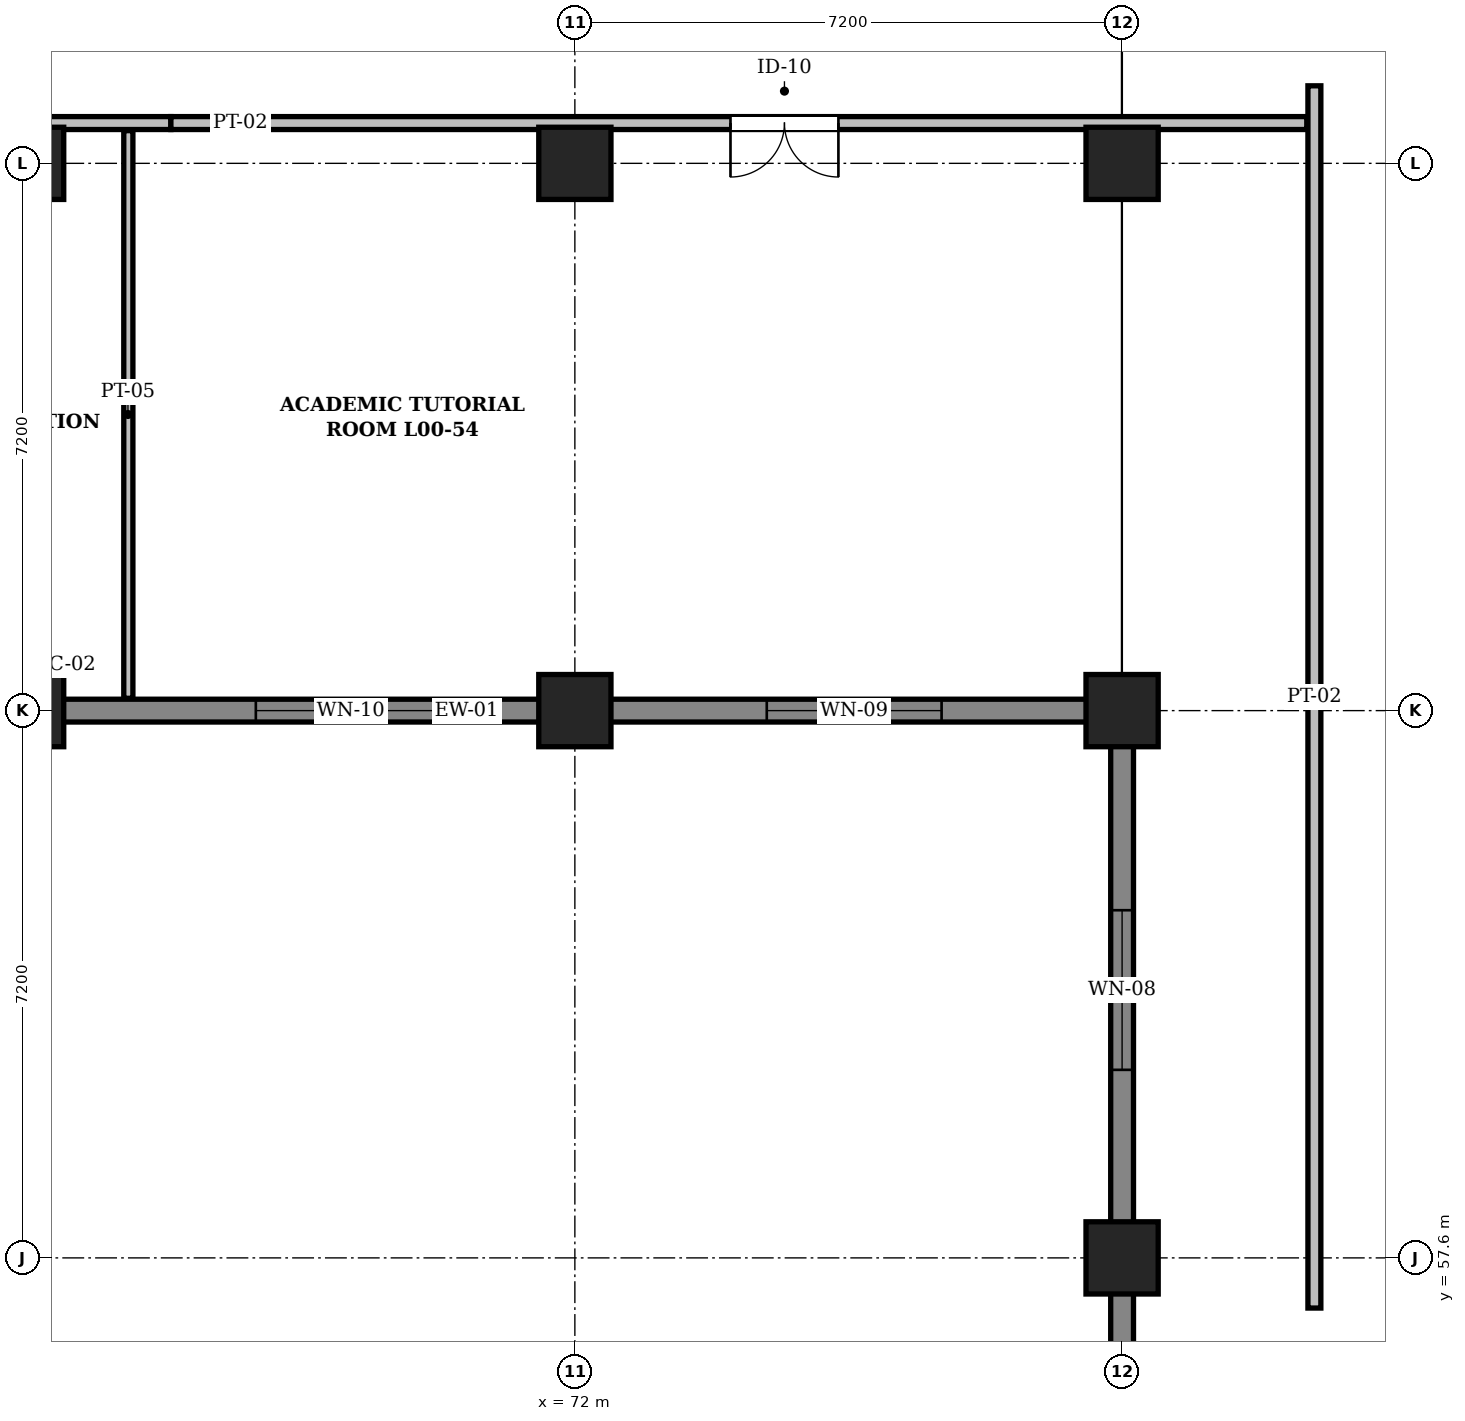
"""IFC4 building model, lengths in metres.
Left out: names, types, materials, properties, quantities, classifications, styles, units other than length and angle.
Written with IfcOpenShell. Run it as: python <this file> out.ifc"""

import sys

from ifc_helpers import new_model, si_unit, direction, frame, frame_2d, origin, origin_2d, place, context, subcontext, project, spatial, rectangle, extrude, element, fill, save


model = new_model("IFC4")
c1 = context("Model", 3, precision=1e-05, world=origin(), true_north=direction((0.0, 1.0)))
c2 = subcontext(c1, "Body", "Model", "MODEL_VIEW")
j1 = project(units=[si_unit("LENGTHUNIT", "METRE"), si_unit("PLANEANGLEUNIT", "RADIAN")], contexts=[c1])
p1 = place(None, origin())
s1 = spatial("IfcSite", under=j1, at=p1, CompositionType="ELEMENT")
p2 = place(p1, origin())
s2 = spatial("IfcBuilding", under=s1, at=p2, CompositionType="ELEMENT")
p3 = place(p2, origin())
s3 = spatial("IfcBuildingStorey", under=s2, at=p3, CompositionType="ELEMENT", Elevation=0.0)
for number, where, z_axis, x_axis in (
    (1, (64.8, 64.8, 0.0), (0.0, 0.0, 1.0), (1.0, 0.0, 0.0)),
    (2, (64.8, 72.0, 0.0), (0.0, 0.0, 1.0), (1.0, 0.0, 0.0)),
    (3, (72.0, 64.8, 0.0), (0.0, 0.0, 1.0), (1.0, 0.0, 0.0)),
    (4, (72.0, 72.0, 0.0), (0.0, 0.0, 1.0), (1.0, 0.0, 0.0)),
    (5, (79.2, 57.6, 0.0), (0.0, 0.0, 1.0), (1.0, 0.0, 0.0)),
    (6, (79.2, 64.8, 0.0), (0.0, 0.0, 1.0), (1.0, 0.0, 0.0)),
    (7, (79.2, 72.0, 0.0), (0.0, 0.0, 1.0), (1.0, 0.0, 0.0)),
):
    element("IfcColumn", number, at=place(p3, frame(where, z_axis=z_axis, x_axis=x_axis)), inside=s3, PredefinedType="COLUMN", context=c2, shape_type="SweptSolid", body=[
        extrude(rectangle(XDim=0.95, YDim=0.95, at=origin_2d()), origin(), (0.0, 0.0, 1.0), 4.8),
    ])
p4 = place(p3, frame((79.2, 50.4, 0.0), z_axis=(0.0, 0.0, 1.0), x_axis=(0.0, 1.0, 0.0)))
e8 = element("IfcWall", 8, at=p4, inside=s3, PredefinedType="SOLIDWALL", context=c2, shape_type="SweptSolid", body=[
    extrude(rectangle(XDim=7.2, YDim=0.3, at=frame_2d((3.6, 0.0))), origin(), (0.0, 0.0, 1.0), 4.52),
])
p5 = place(p4, frame((2.65, 0.0, 0.95)))
e9 = element("IfcOpeningElement", 9, at=p5, cuts=e8, PredefinedType="OPENING", context=c2, shape_type="SweptSolid", body=[
    extrude(rectangle(XDim=1.9, YDim=1.3, at=frame_2d((0.95, 0.65))), frame((0.0, 0.162, 0.0), z_axis=(0.0, -1.0, 0.0), x_axis=(1.0, 0.0, 0.0)), (0.0, 0.0, 1.0), 0.324),
])
p6 = place(p3, frame((79.2, 57.6, 0.0), z_axis=(0.0, 0.0, 1.0), x_axis=(0.0, 1.0, 0.0)))
e10 = element("IfcWall", 10, at=p6, inside=s3, PredefinedType="SOLIDWALL", context=c2, shape_type="SweptSolid", body=[
    extrude(rectangle(XDim=7.048, YDim=0.3, at=frame_2d((3.524, 0.0))), origin(), (0.0, 0.0, 1.0), 4.52),
])
p7 = place(p6, frame((2.474, 0.0, 0.95)))
e11 = element("IfcOpeningElement", 11, at=p7, cuts=e10, PredefinedType="OPENING", context=c2, shape_type="SweptSolid", body=[
    extrude(rectangle(XDim=2.1, YDim=1.3, at=frame_2d((1.05, 0.65))), frame((0.0, 0.162, 0.0), z_axis=(0.0, -1.0, 0.0), x_axis=(1.0, 0.0, 0.0)), (0.0, 0.0, 1.0), 0.324),
])
p8 = place(p3, frame((79.35, 64.8, 0.0), z_axis=(0.0, 0.0, 1.0), x_axis=(-1.0, 0.0, 0.0)))
e12 = element("IfcWall", 12, at=p8, inside=s3, PredefinedType="SOLIDWALL", context=c2, shape_type="SweptSolid", body=[
    extrude(rectangle(XDim=7.35, YDim=0.3, at=frame_2d((3.675, 0.0))), origin(), (0.0, 0.0, 1.0), 4.52),
])
p9 = place(p8, frame((2.525, 0.0, 0.95)))
e13 = element("IfcOpeningElement", 13, at=p9, cuts=e12, PredefinedType="OPENING", context=c2, shape_type="SweptSolid", body=[
    extrude(rectangle(XDim=2.3, YDim=1.3, at=frame_2d((1.15, 0.65))), frame((0.0, 0.162, 0.0), z_axis=(0.0, -1.0, 0.0), x_axis=(1.0, 0.0, 0.0)), (0.0, 0.0, 1.0), 0.324),
])
p10 = place(p3, frame((72.0, 64.8, 0.0), z_axis=(0.0, 0.0, 1.0), x_axis=(-1.0, 0.0, 0.0)))
e14 = element("IfcWall", 14, at=p10, inside=s3, PredefinedType="SOLIDWALL", context=c2, shape_type="SweptSolid", body=[
    extrude(rectangle(XDim=7.2, YDim=0.3, at=frame_2d((3.6, 0.0))), origin(), (0.0, 0.0, 1.0), 4.52),
])
p11 = place(p10, frame((1.698, 0.0, 0.95)))
e15 = element("IfcOpeningElement", 15, at=p11, cuts=e14, PredefinedType="OPENING", context=c2, shape_type="SweptSolid", body=[
    extrude(rectangle(XDim=2.5, YDim=1.3, at=frame_2d((1.25, 0.65))), frame((0.0, 0.162, 0.0), z_axis=(0.0, -1.0, 0.0), x_axis=(1.0, 0.0, 0.0)), (0.0, 0.0, 1.0), 0.324),
])
p12 = place(p3, frame((81.73, 56.94, 0.0), z_axis=(0.0, 0.0, 1.0), x_axis=(0.0, 1.0, 0.0)))
e16 = element("IfcWall", 16, at=p12, inside=s3, PredefinedType="PARTITIONING", context=c2, shape_type="SweptSolid", body=[
    extrude(rectangle(XDim=16.08, YDim=0.17, at=frame_2d((8.04, 0.0))), origin(), (0.0, 0.0, 1.0), 4.46),
])
p13 = place(p3, frame((50.03, 72.53, 0.0), z_axis=(0.0, 0.0, 1.0), x_axis=(1.0, 0.0, 0.0)))
e17 = element("IfcWall", 17, at=p13, inside=s3, PredefinedType="PARTITIONING", context=c2, shape_type="SweptSolid", body=[
    extrude(rectangle(XDim=16.655, YDim=0.17, at=frame_2d((8.328, 0.0))), origin(), (0.0, 0.0, 1.0), 4.46),
])
p14 = place(p13, frame((9.718, 0.0, 0.0)))
e18 = element("IfcOpeningElement", 18, at=p14, cuts=e17, PredefinedType="OPENING", context=c2, shape_type="SweptSolid", body=[
    extrude(rectangle(XDim=1.22, YDim=2.22, at=frame_2d((0.61, 1.11))), frame((0.0, 0.097, 0.0), z_axis=(0.0, -1.0, 0.0), x_axis=(1.0, 0.0, 0.0)), (0.0, 0.0, 1.0), 0.194),
])
p15 = place(p3, frame((66.685, 72.53, 0.0), z_axis=(0.0, 0.0, 1.0), x_axis=(1.0, 0.0, 0.0)))
e19 = element("IfcWall", 19, at=p15, inside=s3, PredefinedType="PARTITIONING", context=c2, shape_type="SweptSolid", body=[
    extrude(rectangle(XDim=14.945, YDim=0.17, at=frame_2d((7.472, 0.0))), origin(), (0.0, 0.0, 1.0), 4.46),
])
p16 = place(p15, frame((7.363, 0.0, 0.0)))
e20 = element("IfcOpeningElement", 20, at=p16, cuts=e19, PredefinedType="OPENING", context=c2, shape_type="SweptSolid", body=[
    extrude(rectangle(XDim=1.42, YDim=2.24, at=frame_2d((0.71, 1.12))), frame((0.0, 0.097, 0.0), z_axis=(0.0, -1.0, 0.0), x_axis=(1.0, 0.0, 0.0)), (0.0, 0.0, 1.0), 0.194),
])
p17 = place(p3, frame((66.125, 64.962, 0.0), z_axis=(0.0, 0.0, 1.0), x_axis=(0.0, 1.0, 0.0)))
e21 = element("IfcWall", 21, at=p17, inside=s3, PredefinedType="PARTITIONING", context=c2, shape_type="SweptSolid", body=[
    extrude(rectangle(XDim=7.468, YDim=0.12, at=frame_2d((3.734, 0.0))), origin(), (0.0, 0.0, 1.0), 4.46),
])
p18 = place(p7, origin())
e22 = element("IfcWindow", 22, at=p18, inside=s3, PartitioningType="SINGLE_PANEL", PredefinedType="WINDOW", context=c2, shape_type="SweptSolid", body=[
    extrude(rectangle(XDim=2.1, YDim=1.3, at=frame_2d((1.05, 0.65))), frame((0.0, 0.03, 0.0), z_axis=(0.0, -1.0, 0.0), x_axis=(1.0, 0.0, 0.0)), (0.0, 0.0, 1.0), 0.06),
])
fill(e11, e22)
p19 = place(p9, origin())
e23 = element("IfcWindow", 23, at=p19, inside=s3, PartitioningType="SINGLE_PANEL", PredefinedType="WINDOW", context=c2, shape_type="SweptSolid", body=[
    extrude(rectangle(XDim=2.3, YDim=1.3, at=frame_2d((1.15, 0.65))), frame((0.0, 0.03, 0.0), z_axis=(0.0, -1.0, 0.0), x_axis=(1.0, 0.0, 0.0)), (0.0, 0.0, 1.0), 0.06),
])
fill(e13, e23)
p20 = place(p11, origin())
e24 = element("IfcWindow", 24, at=p20, inside=s3, PartitioningType="SINGLE_PANEL", PredefinedType="WINDOW", context=c2, shape_type="SweptSolid", body=[
    extrude(rectangle(XDim=2.5, YDim=1.3, at=frame_2d((1.25, 0.65))), frame((0.0, 0.03, 0.0), z_axis=(0.0, -1.0, 0.0), x_axis=(1.0, 0.0, 0.0)), (0.0, 0.0, 1.0), 0.06),
])
fill(e15, e24)
p21 = place(p16, frame((1.42, 0.0, 0.0), z_axis=(0.0, 0.0, 1.0), x_axis=(-1.0, 0.0, 0.0)))
e25 = element("IfcDoor", 25, at=p21, inside=s3, OperationType="DOUBLE_DOOR_SINGLE_SWING", PredefinedType="DOOR", context=c2, shape_type="SweptSolid", body=[
    extrude(rectangle(XDim=1.42, YDim=2.24, at=frame_2d((0.71, 1.12))), frame((0.0, 0.025, 0.0), z_axis=(0.0, -1.0, 0.0), x_axis=(1.0, 0.0, 0.0)), (0.0, 0.0, 1.0), 0.05),
])
fill(e20, e25)
save(model, sys.argv[1])
